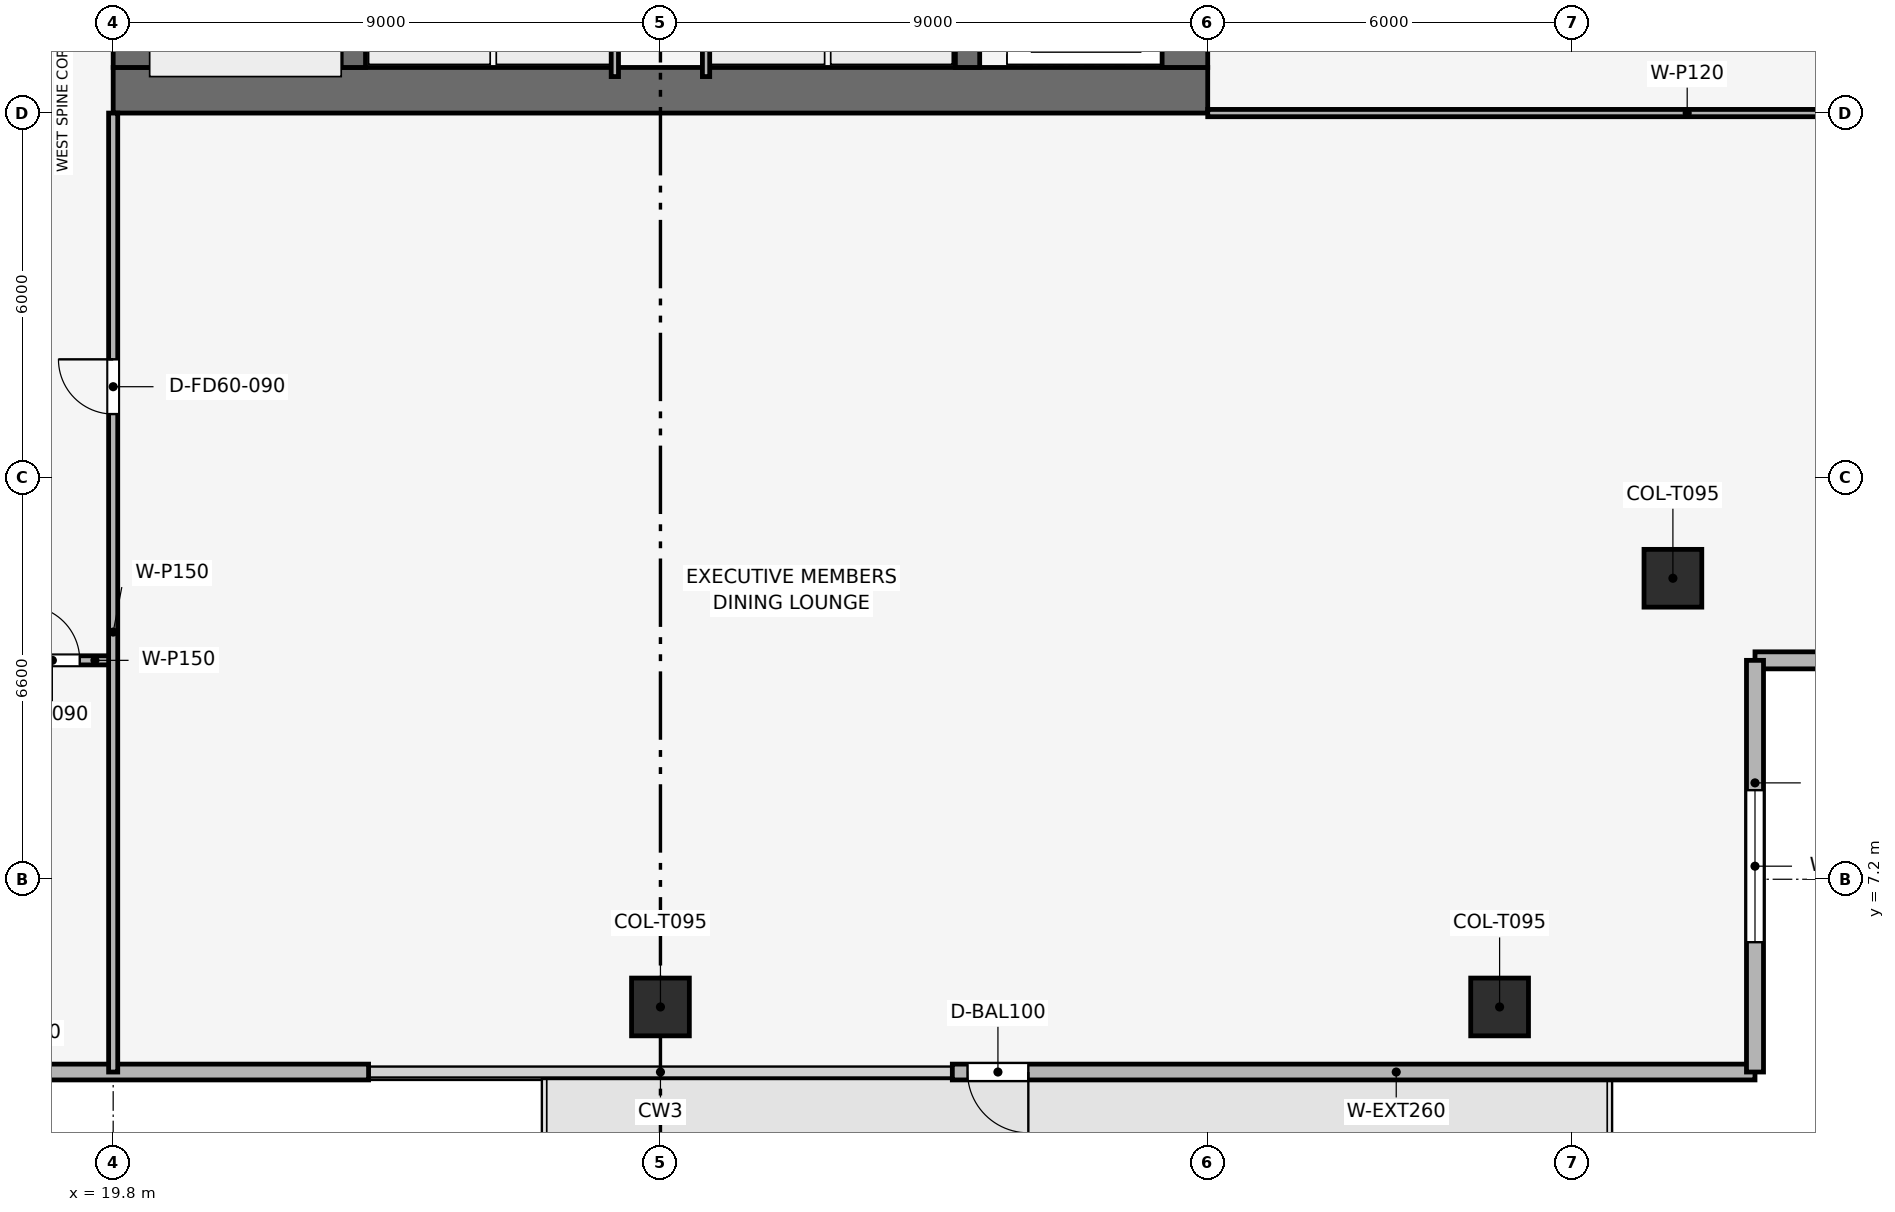
"""IFC4 building model, lengths in metres.
Left out: names, types, materials, properties, quantities, classifications, styles, units other than length and angle.
Written with IfcOpenShell. Run it as: python <this file> out.ifc"""

import sys

from ifc_helpers import new_model, si_unit, direction, frame, frame_2d, origin, origin_2d, place, context, subcontext, project, spatial, rectangle, extrude, element, fill, save


model = new_model("IFC4")
c1 = context("Model", 3, precision=1e-05, world=origin(), true_north=direction((0.0, 1.0)))
c2 = subcontext(c1, "Body", "Model", "MODEL_VIEW")
j1 = project(units=[si_unit("LENGTHUNIT", "METRE"), si_unit("PLANEANGLEUNIT", "RADIAN")], contexts=[c1])
p1 = place(None, origin())
s1 = spatial("IfcSite", under=j1, at=p1, CompositionType="ELEMENT")
p2 = place(p1, origin())
s2 = spatial("IfcBuilding", under=s1, at=p2, CompositionType="ELEMENT")
p3 = place(p2, frame((0.0, 0.0, 272.85)))
s3 = spatial("IfcBuildingStorey", under=s2, at=p3, CompositionType="ELEMENT", Elevation=272.85)
p4 = place(p3, frame((19.8, 20.175, 0.0), z_axis=(0.0, 0.0, 1.0), x_axis=(1.0, 0.0, 0.0)))
e1 = element("IfcWall", 1, at=p4, inside=s3, PredefinedType="SHEAR", context=c2, shape_type="SweptSolid", body=[
    extrude(rectangle(XDim=18.0, YDim=0.75, at=frame_2d((9.0, 0.0))), origin(), (0.0, 0.0, 1.0), 3.75),
])
p5 = place(p3, frame((20.175, 20.55, 0.0), z_axis=(0.0, 0.0, 1.0), x_axis=(0.0, 1.0, 0.0)))
e2 = element("IfcWall", 2, at=p5, inside=s3, PredefinedType="SHEAR", context=c2, shape_type="SweptSolid", body=[
    extrude(rectangle(XDim=16.5, YDim=0.75, at=frame_2d((8.25, 0.0))), origin(), (0.0, 0.0, 1.0), 3.75),
])
p6 = place(p5, frame((10.25, 0.0, 0.0)))
e3 = element("IfcOpeningElement", 3, at=p6, cuts=e2, PredefinedType="OPENING", context=c2, shape_type="SweptSolid", body=[
    extrude(rectangle(XDim=1.1, YDim=2.15, at=frame_2d((0.55, 1.075))), frame((0.0, 0.385, 0.0), z_axis=(0.0, -1.0, 0.0), x_axis=(1.0, 0.0, 0.0)), (0.0, 0.0, 1.0), 0.77),
])
p7 = place(p3, frame((37.425, 20.55, 0.0), z_axis=(0.0, 0.0, 1.0), x_axis=(0.0, 1.0, 0.0)))
e4 = element("IfcWall", 4, at=p7, inside=s3, PredefinedType="SHEAR", context=c2, shape_type="SweptSolid", body=[
    extrude(rectangle(XDim=16.5, YDim=0.75, at=frame_2d((8.25, 0.0))), origin(), (0.0, 0.0, 1.0), 3.75),
])
p8 = place(p7, frame((4.75, 0.0, 0.0)))
e5 = element("IfcOpeningElement", 5, at=p8, cuts=e4, PredefinedType="OPENING", context=c2, shape_type="SweptSolid", body=[
    extrude(rectangle(XDim=1.1, YDim=2.15, at=frame_2d((0.55, 1.075))), frame((0.0, 0.385, 0.0), z_axis=(0.0, -1.0, 0.0), x_axis=(1.0, 0.0, 0.0)), (0.0, 0.0, 1.0), 0.77),
])
for number, where, z_axis, x_axis in (
    (6, (23.75, 20.55, 0.0), (0.0, 0.0, 1.0), (0.0, 1.0, 0.0)),
    (7, (33.85, 20.55, 0.0), (0.0, 0.0, 1.0), (0.0, 1.0, 0.0)),
):
    element("IfcWall", number, at=place(p3, frame(where, z_axis=z_axis, x_axis=x_axis)), inside=s3, PredefinedType="SHEAR", context=c2, shape_type="SweptSolid", body=[
        extrude(rectangle(XDim=16.5, YDim=0.4, at=frame_2d((8.25, 0.0))), origin(), (0.0, 0.0, 1.0), 3.75),
    ])
for number, where, z_axis, x_axis in (
    (8, (28.8, 5.1, 0.003), (0.0, 0.0, 1.0), (1.0, 0.0, 0.0)),
    (9, (42.6, 5.1, 0.003), (0.0, 0.0, 1.0), (1.0, 0.0, 0.0)),
    (10, (45.45, 12.15, 0.003), (0.0, 0.0, 1.0), (1.0, 0.0, 0.0)),
):
    element("IfcColumn", number, at=place(p3, frame(where, z_axis=z_axis, x_axis=x_axis)), inside=s3, PredefinedType="COLUMN", context=c2, shape_type="SweptSolid", body=[
        extrude(rectangle(XDim=0.95, YDim=0.95, at=origin_2d()), origin(), (0.0, 0.0, 1.0), 3.494),
    ])
p9 = place(p3, frame((46.8, 4.03, 0.0), z_axis=(0.0, 0.0, 1.0), x_axis=(-1.0, 0.0, 0.0)))
e11 = element("IfcWall", 11, at=p9, inside=s3, PredefinedType="SOLIDWALL", context=c2, shape_type="SweptSolid", body=[
    extrude(rectangle(XDim=13.2, YDim=0.26, at=frame_2d((6.6, 0.0))), origin(), (0.0, 0.0, 1.0), 3.5),
])
p10 = place(p9, frame((11.95, 0.0, 0.0)))
e12 = element("IfcOpeningElement", 12, at=p10, cuts=e11, PredefinedType="OPENING", context=c2, shape_type="SweptSolid", body=[
    extrude(rectangle(XDim=1.0, YDim=2.2, at=frame_2d((0.5, 1.1))), frame((0.0, 0.14, 0.0), z_axis=(0.0, -1.0, 0.0), x_axis=(1.0, 0.0, 0.0)), (0.0, 0.0, 1.0), 0.28),
])
p11 = place(p3, frame((24.0, 4.03, 0.0), z_axis=(0.0, 0.0, 1.0), x_axis=(-1.0, 0.0, 0.0)))
e13 = element("IfcWall", 13, at=p11, inside=s3, PredefinedType="SOLIDWALL", context=c2, shape_type="SweptSolid", body=[
    extrude(rectangle(XDim=13.2, YDim=0.26, at=frame_2d((6.6, 0.0))), origin(), (0.0, 0.0, 1.0), 3.5),
])
p12 = place(p11, frame((11.75, 0.0, 0.9)))
e14 = element("IfcOpeningElement", 14, at=p12, cuts=e13, PredefinedType="OPENING", context=c2, shape_type="SweptSolid", body=[
    extrude(rectangle(XDim=1.2, YDim=2.1, at=frame_2d((0.6, 1.05))), frame((0.0, 0.14, 0.0), z_axis=(0.0, -1.0, 0.0), x_axis=(1.0, 0.0, 0.0)), (0.0, 0.0, 1.0), 0.28),
])
p13 = place(p3, frame((53.57, 10.8, 0.0), z_axis=(0.0, 0.0, 1.0), x_axis=(-1.0, 0.0, 0.0)))
e15 = element("IfcWall", 15, at=p13, inside=s3, PredefinedType="SOLIDWALL", context=c2, shape_type="SweptSolid", body=[
    extrude(rectangle(XDim=6.77, YDim=0.28, at=frame_2d((3.385, 0.0))), origin(), (0.0, 0.0, 1.0), 3.5),
])
p14 = place(p13, frame((2.135, 0.0, 0.9)))
e16 = element("IfcOpeningElement", 16, at=p14, cuts=e15, PredefinedType="OPENING", context=c2, shape_type="SweptSolid", body=[
    extrude(rectangle(XDim=2.5, YDim=1.9, at=frame_2d((1.25, 0.95))), frame((0.0, 0.15, 0.0), z_axis=(0.0, -1.0, 0.0), x_axis=(1.0, 0.0, 0.0)), (0.0, 0.0, 1.0), 0.3),
])
p15 = place(p3, frame((46.8, 10.8, 0.0), z_axis=(0.0, 0.0, 1.0), x_axis=(0.0, -1.0, 0.0)))
e17 = element("IfcWall", 17, at=p15, inside=s3, PredefinedType="SOLIDWALL", context=c2, shape_type="SweptSolid", body=[
    extrude(rectangle(XDim=6.77, YDim=0.28, at=frame_2d((3.385, 0.0))), origin(), (0.0, 0.0, 1.0), 3.5),
])
p16 = place(p15, frame((2.135, 0.0, 0.9)))
e18 = element("IfcOpeningElement", 18, at=p16, cuts=e17, PredefinedType="OPENING", context=c2, shape_type="SweptSolid", body=[
    extrude(rectangle(XDim=2.5, YDim=1.9, at=frame_2d((1.25, 0.95))), frame((0.0, 0.15, 0.0), z_axis=(0.0, -1.0, 0.0), x_axis=(1.0, 0.0, 0.0)), (0.0, 0.0, 1.0), 0.3),
])
for number, where, z_axis, x_axis in (
    (19, (28.05, 20.4, 0.0), (0.0, 0.0, 1.0), (0.0, 1.0, 0.0)),
    (20, (29.55, 20.4, 0.0), (0.0, 0.0, 1.0), (0.0, 1.0, 0.0)),
):
    element("IfcWall", number, at=place(p3, frame(where, z_axis=z_axis, x_axis=x_axis)), inside=s3, PredefinedType="PARTITIONING", context=c2, shape_type="SweptSolid", body=[
        extrude(rectangle(XDim=2.75, YDim=0.12, at=frame_2d((1.375, 0.0))), origin(), (0.0, 0.0, 1.0), 3.5),
    ])
p17 = place(p3, frame((17.9, 10.8, 0.0), z_axis=(0.0, 0.0, 1.0), x_axis=(1.0, 0.0, 0.0)))
e21 = element("IfcWall", 21, at=p17, inside=s3, PredefinedType="PARTITIONING", context=c2, shape_type="SweptSolid", body=[
    extrude(rectangle(XDim=1.9, YDim=0.15, at=frame_2d((0.95, 0.0))), origin(), (0.0, 0.0, 1.0), 3.5),
])
p18 = place(p17, frame((0.45, 0.0, 0.0)))
e22 = element("IfcOpeningElement", 22, at=p18, cuts=e21, PredefinedType="OPENING", context=c2, shape_type="SweptSolid", body=[
    extrude(rectangle(XDim=0.9, YDim=2.1, at=frame_2d((0.45, 1.05))), frame((0.0, 0.085, 0.0), z_axis=(0.0, -1.0, 0.0), x_axis=(1.0, 0.0, 0.0)), (0.0, 0.0, 1.0), 0.17),
])
p19 = place(p3, frame((19.8, 4.03, 0.0), z_axis=(0.0, 0.0, 1.0), x_axis=(0.0, 1.0, 0.0)))
e23 = element("IfcWall", 23, at=p19, inside=s3, PredefinedType="PARTITIONING", context=c2, shape_type="SweptSolid", body=[
    extrude(rectangle(XDim=15.77, YDim=0.15, at=frame_2d((7.885, 0.0))), origin(), (0.0, 0.0, 1.0), 3.085),
])
p20 = place(p19, frame((10.82, 0.0, 0.0)))
e24 = element("IfcOpeningElement", 24, at=p20, cuts=e23, PredefinedType="OPENING", context=c2, shape_type="SweptSolid", body=[
    extrude(rectangle(XDim=0.9, YDim=2.1, at=frame_2d((0.45, 1.05))), frame((0.0, 0.085, 0.0), z_axis=(0.0, -1.0, 0.0), x_axis=(1.0, 0.0, 0.0)), (0.0, 0.0, 1.0), 0.17),
])
p21 = place(p3, frame((37.8, 19.8, 0.0), z_axis=(0.0, 0.0, 1.0), x_axis=(1.0, 0.0, 0.0)))
e25 = element("IfcWall", 25, at=p21, inside=s3, PredefinedType="PARTITIONING", context=c2, shape_type="SweptSolid", body=[
    extrude(rectangle(XDim=15.77, YDim=0.12, at=frame_2d((7.885, 0.0))), origin(), (0.0, 0.0, 1.0), 3.085),
])
p22 = place(p10, origin())
e26 = element("IfcDoor", 26, at=p22, inside=s3, OperationType="SINGLE_SWING_LEFT", PredefinedType="DOOR", context=c2, shape_type="SweptSolid", body=[
    extrude(rectangle(XDim=1.0, YDim=2.2, at=frame_2d((0.5, 1.1))), frame((0.0, 0.025, 0.0), z_axis=(0.0, -1.0, 0.0), x_axis=(1.0, 0.0, 0.0)), (0.0, 0.0, 1.0), 0.05),
])
fill(e12, e26)
p23 = place(p16, origin())
e27 = element("IfcWindow", 27, at=p23, inside=s3, PartitioningType="SINGLE_PANEL", PredefinedType="WINDOW", context=c2, shape_type="SweptSolid", body=[
    extrude(rectangle(XDim=2.5, YDim=1.9, at=frame_2d((1.25, 0.95))), frame((0.0, 0.03, 0.0), z_axis=(0.0, -1.0, 0.0), x_axis=(1.0, 0.0, 0.0)), (0.0, 0.0, 1.0), 0.06),
])
fill(e18, e27)
p24 = place(p18, origin())
e28 = element("IfcDoor", 28, at=p24, inside=s3, OperationType="SINGLE_SWING_LEFT", PredefinedType="DOOR", context=c2, shape_type="SweptSolid", body=[
    extrude(rectangle(XDim=0.9, YDim=2.1, at=frame_2d((0.45, 1.05))), frame((0.0, 0.025, 0.0), z_axis=(0.0, -1.0, 0.0), x_axis=(1.0, 0.0, 0.0)), (0.0, 0.0, 1.0), 0.05),
])
fill(e22, e28)
p25 = place(p20, origin())
e29 = element("IfcDoor", 29, at=p25, inside=s3, OperationType="SINGLE_SWING_RIGHT", PredefinedType="DOOR", context=c2, shape_type="SweptSolid", body=[
    extrude(rectangle(XDim=0.9, YDim=2.1, at=frame_2d((0.45, 1.05))), frame((0.0, 0.025, 0.0), z_axis=(0.0, -1.0, 0.0), x_axis=(1.0, 0.0, 0.0)), (0.0, 0.0, 1.0), 0.05),
])
fill(e24, e29)
save(model, sys.argv[1])
